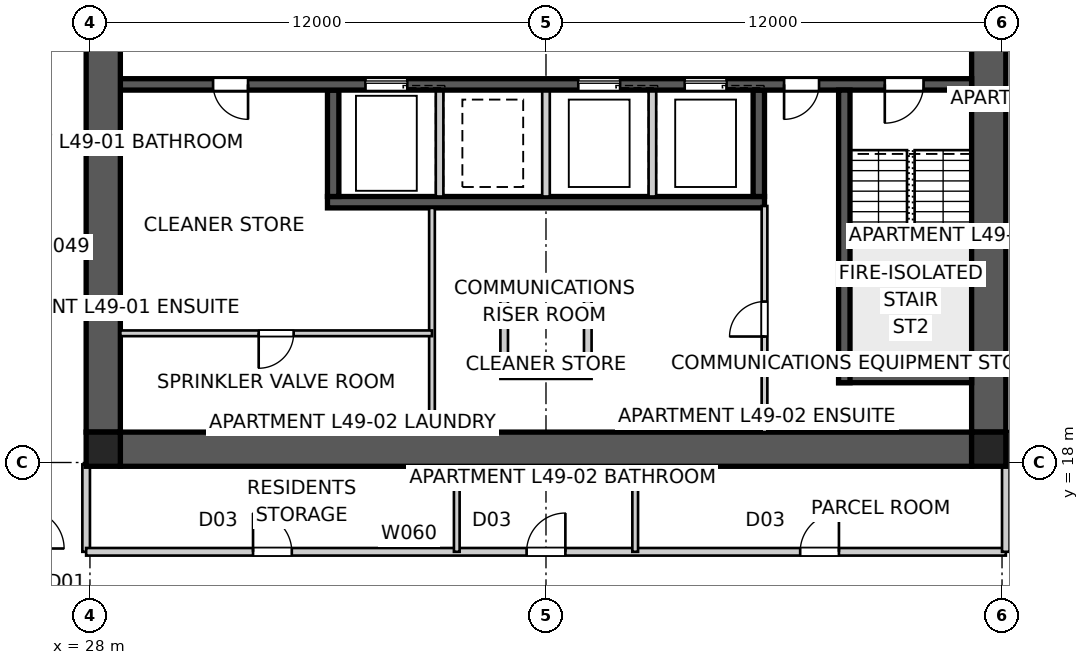
"""IFC4 building model, lengths in metres.
Left out: names, types, materials, properties, quantities, classifications, styles, units other than length and angle.
Written with IfcOpenShell. Run it as: python <this file> out.ifc"""

import sys

from ifc_helpers import new_model, si_unit, direction, frame, frame_2d, origin, origin_2d, place, context, subcontext, project, spatial, polyline, rectangle, outline, extrude, element, fill, save


model = new_model("IFC4")
c1 = context("Model", 3, precision=1e-05, world=origin(), true_north=direction((0.0, 1.0)))
c2 = subcontext(c1, "Body", "Model", "MODEL_VIEW")
j1 = project(units=[si_unit("LENGTHUNIT", "METRE"), si_unit("PLANEANGLEUNIT", "RADIAN")], contexts=[c1])
p1 = place(None, origin())
s1 = spatial("IfcSite", under=j1, at=p1, CompositionType="ELEMENT")
p2 = place(p1, origin())
s2 = spatial("IfcBuilding", under=s1, at=p2, CompositionType="ELEMENT")
p3 = place(p2, frame((0.0, 0.0, 179.4)))
s3 = spatial("IfcBuildingStorey", under=s2, at=p3, CompositionType="ELEMENT", Elevation=179.4)
p4 = place(p3, frame((51.2, 18.35, 0.0), z_axis=(0.0, 0.0, 1.0), x_axis=(-1.0, 0.0, 0.0)))
e1 = element("IfcWall", 1, at=p4, inside=s3, PredefinedType="SHEAR", context=c2, shape_type="SweptSolid", body=[
    extrude(outline(polyline([(0.0, -0.45), (22.4, -0.45), (22.4, -0.025), (22.85, -0.025), (22.85, 0.025), (22.4, 0.025), (22.4, 0.45), (0.0, 0.45), (0.0, 0.025), (-0.45, 0.025), (-0.45, -0.025), (0.0, -0.025), (0.0, -0.45)])), origin(), (0.0, 0.0, 1.0), 3.4),
])
p5 = place(p3, frame((51.65, 18.8, 0.0), z_axis=(0.0, 0.0, 1.0), x_axis=(0.0, 1.0, 0.0)))
e2 = element("IfcWall", 2, at=p5, inside=s3, PredefinedType="SHEAR", context=c2, shape_type="SweptSolid", body=[
    extrude(outline(polyline([(0.0, -0.45), (22.4, -0.45), (22.4, -0.025), (22.85, -0.025), (22.85, 0.025), (22.4, 0.025), (22.4, 0.45), (0.0, 0.45), (0.0, 0.025), (-0.45, 0.025), (-0.45, -0.025), (0.0, -0.025), (0.0, -0.45)])), origin(), (0.0, 0.0, 1.0), 3.4),
])
p6 = place(p5, frame((11.14, 0.0, 0.0)))
e3 = element("IfcOpeningElement", 3, at=p6, cuts=e2, PredefinedType="OPENING", context=c2, shape_type="SweptSolid", body=[
    extrude(rectangle(XDim=1.02, YDim=2.4, at=frame_2d((0.51, 1.2))), frame((0.0, 0.46, 0.0), z_axis=(0.0, -1.0, 0.0), x_axis=(1.0, 0.0, 0.0)), (0.0, 0.0, 1.0), 0.92),
])
p7 = place(p3, frame((28.35, 41.2, 0.0), z_axis=(0.0, 0.0, 1.0), x_axis=(0.0, -1.0, 0.0)))
e4 = element("IfcWall", 4, at=p7, inside=s3, PredefinedType="SHEAR", context=c2, shape_type="SweptSolid", body=[
    extrude(outline(polyline([(0.0, -0.45), (22.4, -0.45), (22.4, -0.025), (22.85, -0.025), (22.85, 0.025), (22.4, 0.025), (22.4, 0.45), (0.0, 0.45), (0.0, 0.025), (-0.45, 0.025), (-0.45, -0.025), (0.0, -0.025), (0.0, -0.45)])), origin(), (0.0, 0.0, 1.0), 3.4),
])
p8 = place(p7, frame((11.14, 0.0, 0.0)))
e5 = element("IfcOpeningElement", 5, at=p8, cuts=e4, PredefinedType="OPENING", context=c2, shape_type="SweptSolid", body=[
    extrude(rectangle(XDim=1.02, YDim=2.4, at=frame_2d((0.51, 1.2))), frame((0.0, 0.46, 0.0), z_axis=(0.0, -1.0, 0.0), x_axis=(1.0, 0.0, 0.0)), (0.0, 0.0, 1.0), 0.92),
])
p9 = place(p3, frame((51.2, 27.95, 0.0), z_axis=(0.0, 0.0, 1.0), x_axis=(-1.0, 0.0, 0.0)))
e6 = element("IfcWall", 6, at=p9, inside=s3, PredefinedType="SHEAR", context=c2, shape_type="SweptSolid", body=[
    extrude(rectangle(XDim=22.4, YDim=0.3, at=frame_2d((11.2, 0.0))), origin(), (0.0, 0.0, 1.0), 3.4),
])
p10 = place(p9, frame((19.04, 0.0, 0.0)))
e7 = element("IfcOpeningElement", 7, at=p10, cuts=e6, PredefinedType="OPENING", context=c2, shape_type="SweptSolid", body=[
    extrude(rectangle(XDim=0.92, YDim=2.1, at=frame_2d((0.46, 1.05))), frame((0.0, 0.16, 0.0), z_axis=(0.0, -1.0, 0.0), x_axis=(1.0, 0.0, 0.0)), (0.0, 0.0, 1.0), 0.32),
])
p11 = place(p9, frame((1.265, 0.0, 0.0)))
e8 = element("IfcOpeningElement", 8, at=p11, cuts=e6, PredefinedType="OPENING", context=c2, shape_type="SweptSolid", body=[
    extrude(rectangle(XDim=1.02, YDim=2.1, at=frame_2d((0.51, 1.05))), frame((0.0, 0.16, 0.0), z_axis=(0.0, -1.0, 0.0), x_axis=(1.0, 0.0, 0.0)), (0.0, 0.0, 1.0), 0.32),
])
p12 = place(p9, frame((4.015, 0.0, 0.0)))
e9 = element("IfcOpeningElement", 9, at=p12, cuts=e6, PredefinedType="OPENING", context=c2, shape_type="SweptSolid", body=[
    extrude(rectangle(XDim=0.92, YDim=2.1, at=frame_2d((0.46, 1.05))), frame((0.0, 0.16, 0.0), z_axis=(0.0, -1.0, 0.0), x_axis=(1.0, 0.0, 0.0)), (0.0, 0.0, 1.0), 0.32),
])
p13 = place(p9, frame((6.45, 0.0, 0.0)))
e10 = element("IfcOpeningElement", 10, at=p13, cuts=e6, PredefinedType="OPENING", context=c2, shape_type="SweptSolid", body=[
    extrude(rectangle(XDim=1.1, YDim=2.1, at=frame_2d((0.55, 1.05))), frame((0.0, 0.16, 0.0), z_axis=(0.0, -1.0, 0.0), x_axis=(1.0, 0.0, 0.0)), (0.0, 0.0, 1.0), 0.32),
])
p14 = place(p9, frame((9.25, 0.0, 0.0)))
e11 = element("IfcOpeningElement", 11, at=p14, cuts=e6, PredefinedType="OPENING", context=c2, shape_type="SweptSolid", body=[
    extrude(rectangle(XDim=1.1, YDim=2.1, at=frame_2d((0.55, 1.05))), frame((0.0, 0.16, 0.0), z_axis=(0.0, -1.0, 0.0), x_axis=(1.0, 0.0, 0.0)), (0.0, 0.0, 1.0), 0.32),
])
p15 = place(p9, frame((14.85, 0.0, 0.0)))
e12 = element("IfcOpeningElement", 12, at=p15, cuts=e6, PredefinedType="OPENING", context=c2, shape_type="SweptSolid", body=[
    extrude(rectangle(XDim=1.1, YDim=2.1, at=frame_2d((0.55, 1.05))), frame((0.0, 0.16, 0.0), z_axis=(0.0, -1.0, 0.0), x_axis=(1.0, 0.0, 0.0)), (0.0, 0.0, 1.0), 0.32),
])
p16 = place(p3, frame((45.75, 24.85, 0.0), z_axis=(0.0, 0.0, 1.0), x_axis=(-1.0, 0.0, 0.0)))
e13 = element("IfcWall", 13, at=p16, inside=s3, PredefinedType="SHEAR", context=c2, shape_type="SweptSolid", body=[
    extrude(rectangle(XDim=11.5, YDim=0.3, at=frame_2d((5.75, 0.0))), origin(), (0.0, 0.0, 1.0), 3.4),
])
p17 = place(p3, frame((45.6, 27.8, 0.0), z_axis=(0.0, 0.0, 1.0), x_axis=(0.0, -1.0, 0.0)))
e14 = element("IfcWall", 14, at=p17, inside=s3, PredefinedType="SHEAR", context=c2, shape_type="SweptSolid", body=[
    extrude(rectangle(XDim=2.8, YDim=0.3, at=frame_2d((1.4, 0.0))), origin(), (0.0, 0.0, 1.0), 3.4),
])
for number, where, z_axis, x_axis in (
    (15, (42.8, 27.8, 0.0), (0.0, 0.0, 1.0), (0.0, -1.0, 0.0)),
    (16, (40.0, 27.8, 0.0), (0.0, 0.0, 1.0), (0.0, -1.0, 0.0)),
    (17, (37.2, 27.8, 0.0), (0.0, 0.0, 1.0), (0.0, -1.0, 0.0)),
):
    element("IfcWall", number, at=place(p3, frame(where, z_axis=z_axis, x_axis=x_axis)), inside=s3, PredefinedType="SOLIDWALL", context=c2, shape_type="SweptSolid", body=[
        extrude(rectangle(XDim=2.8, YDim=0.2, at=frame_2d((1.4, 0.0))), origin(), (0.0, 0.0, 1.0), 3.4),
    ])
p18 = place(p3, frame((34.4, 27.8, 0.0), z_axis=(0.0, 0.0, 1.0), x_axis=(0.0, -1.0, 0.0)))
e18 = element("IfcWall", 18, at=p18, inside=s3, PredefinedType="SHEAR", context=c2, shape_type="SweptSolid", body=[
    extrude(rectangle(XDim=2.8, YDim=0.3, at=frame_2d((1.4, 0.0))), origin(), (0.0, 0.0, 1.0), 3.4),
])
p19 = place(p3, frame((47.85, 27.8, 0.0), z_axis=(0.0, 0.0, 1.0), x_axis=(0.0, -1.0, 0.0)))
e19 = element("IfcWall", 19, at=p19, inside=s3, PredefinedType="SHEAR", context=c2, shape_type="SweptSolid", body=[
    extrude(rectangle(XDim=7.7, YDim=0.3, at=frame_2d((3.85, 0.0))), origin(), (0.0, 0.0, 1.0), 3.4),
])
p20 = place(p3, frame((51.2, 20.25, 0.0), z_axis=(0.0, 0.0, 1.0), x_axis=(-1.0, 0.0, 0.0)))
e20 = element("IfcWall", 20, at=p20, inside=s3, PredefinedType="SHEAR", context=c2, shape_type="SweptSolid", body=[
    extrude(rectangle(XDim=3.5, YDim=0.3, at=frame_2d((1.75, 0.0))), origin(), (0.0, 0.0, 1.0), 3.4),
])
for number, where, z_axis, x_axis in (
    (21, (38.9, 22.4, 0.0), (0.0, 0.0, 1.0), (0.0, -1.0, 0.0)),
    (22, (41.1, 22.4, 0.0), (0.0, 0.0, 1.0), (0.0, -1.0, 0.0)),
):
    element("IfcWall", number, at=place(p3, frame(where, z_axis=z_axis, x_axis=x_axis)), inside=s3, PredefinedType="SOLIDWALL", context=c2, shape_type="SweptSolid", body=[
        extrude(rectangle(XDim=2.0, YDim=0.2, at=frame_2d((1.0, 0.0))), origin(), (0.0, 0.0, 1.0), 3.4),
    ])
for number, where, z_axis, x_axis in (
    (23, (38.8, 22.5, 0.0), (0.0, 0.0, 1.0), (1.0, 0.0, 0.0)),
    (24, (38.8, 20.3, 0.0), (0.0, 0.0, 1.0), (1.0, 0.0, 0.0)),
):
    element("IfcWall", number, at=place(p3, frame(where, z_axis=z_axis, x_axis=x_axis)), inside=s3, PredefinedType="SOLIDWALL", context=c2, shape_type="SweptSolid", body=[
        extrude(rectangle(XDim=2.4, YDim=0.2, at=frame_2d((1.2, 0.0))), origin(), (0.0, 0.0, 1.0), 3.4),
    ])
for number, where, z_axis, x_axis in (
    (25, (28.35, 18.35, 0.0), (0.0, 0.0, 1.0), (1.0, 0.0, 0.0)),
    (26, (51.65, 18.35, 0.0), (0.0, 0.0, 1.0), (1.0, 0.0, 0.0)),
):
    element("IfcColumn", number, at=place(p3, frame(where, z_axis=z_axis, x_axis=x_axis)), inside=s3, PredefinedType="COLUMN", context=c2, shape_type="SweptSolid", body=[
        extrude(rectangle(XDim=0.9, YDim=0.9, at=origin_2d()), origin(), (0.0, 0.0, 1.0), 3.4),
    ])
p21 = place(p3, frame((45.75, 18.8, 0.0), z_axis=(0.0, 0.0, 1.0), x_axis=(0.0, 1.0, 0.0)))
e27 = element("IfcWall", 27, at=p21, inside=s3, PredefinedType="SOLIDWALL", context=c2, shape_type="SweptSolid", body=[
    extrude(rectangle(XDim=5.95, YDim=0.15, at=frame_2d((2.975, 0.0))), origin(), (0.0, 0.0, 1.0), 3.25),
])
p22 = place(p21, frame((2.515, 0.0, 0.0)))
e28 = element("IfcOpeningElement", 28, at=p22, cuts=e27, PredefinedType="OPENING", context=c2, shape_type="SweptSolid", body=[
    extrude(rectangle(XDim=0.92, YDim=2.1, at=frame_2d((0.46, 1.05))), frame((0.0, 0.085, 0.0), z_axis=(0.0, -1.0, 0.0), x_axis=(1.0, 0.0, 0.0)), (0.0, 0.0, 1.0), 0.17),
])
p23 = place(p3, frame((37.0, 18.8, 0.0), z_axis=(0.0, 0.0, 1.0), x_axis=(0.0, 1.0, 0.0)))
e29 = element("IfcWall", 29, at=p23, inside=s3, PredefinedType="SOLIDWALL", context=c2, shape_type="SweptSolid", body=[
    extrude(rectangle(XDim=5.9, YDim=0.15, at=frame_2d((2.95, 0.0))), origin(), (0.0, 0.0, 1.0), 3.25),
])
p24 = place(p3, frame((37.0, 21.4, 0.0), z_axis=(0.0, 0.0, 1.0), x_axis=(-1.0, 0.0, 0.0)))
e30 = element("IfcWall", 30, at=p24, inside=s3, PredefinedType="SOLIDWALL", context=c2, shape_type="SweptSolid", body=[
    extrude(rectangle(XDim=8.2, YDim=0.15, at=frame_2d((4.1, 0.0))), origin(), (0.0, 0.0, 1.0), 3.25),
])
p25 = place(p24, frame((3.64, 0.0, 0.0)))
e31 = element("IfcOpeningElement", 31, at=p25, cuts=e30, PredefinedType="OPENING", context=c2, shape_type="SweptSolid", body=[
    extrude(rectangle(XDim=0.92, YDim=2.1, at=frame_2d((0.46, 1.05))), frame((0.0, 0.085, 0.0), z_axis=(0.0, -1.0, 0.0), x_axis=(1.0, 0.0, 0.0)), (0.0, 0.0, 1.0), 0.17),
])
p26 = place(p3, frame((27.9, 17.95, 0.0), z_axis=(0.0, 0.0, 1.0), x_axis=(0.0, -1.0, 0.0)))
e32 = element("IfcWall", 32, at=p26, inside=s3, PredefinedType="PARTITIONING", context=c2, shape_type="SweptSolid", body=[
    extrude(rectangle(XDim=2.3, YDim=0.2, at=frame_2d((1.15, 0.0))), origin(), (0.0, 0.0, 1.0), 3.25),
])
p27 = place(p3, frame((27.9, 15.65, 0.0), z_axis=(0.0, 0.0, 1.0), x_axis=(1.0, 0.0, 0.0)))
e33 = element("IfcWall", 33, at=p27, inside=s3, PredefinedType="PARTITIONING", context=c2, shape_type="SweptSolid", body=[
    extrude(rectangle(XDim=24.2, YDim=0.2, at=frame_2d((12.1, 0.0))), origin(), (0.0, 0.0, 1.0), 3.25),
])
p28 = place(p27, frame((4.391, 0.0, 0.0)))
e34 = element("IfcOpeningElement", 34, at=p28, cuts=e33, PredefinedType="OPENING", context=c2, shape_type="SweptSolid", body=[
    extrude(rectangle(XDim=1.02, YDim=2.1, at=frame_2d((0.51, 1.05))), frame((0.0, 0.11, 0.0), z_axis=(0.0, -1.0, 0.0), x_axis=(1.0, 0.0, 0.0)), (0.0, 0.0, 1.0), 0.22),
])
p29 = place(p27, frame((18.789, 0.0, 0.0)))
e35 = element("IfcOpeningElement", 35, at=p29, cuts=e33, PredefinedType="OPENING", context=c2, shape_type="SweptSolid", body=[
    extrude(rectangle(XDim=1.02, YDim=2.1, at=frame_2d((0.51, 1.05))), frame((0.0, 0.11, 0.0), z_axis=(0.0, -1.0, 0.0), x_axis=(1.0, 0.0, 0.0)), (0.0, 0.0, 1.0), 0.22),
])
p30 = place(p27, frame((11.59, 0.0, 0.0)))
e36 = element("IfcOpeningElement", 36, at=p30, cuts=e33, PredefinedType="OPENING", context=c2, shape_type="SweptSolid", body=[
    extrude(rectangle(XDim=1.02, YDim=2.1, at=frame_2d((0.51, 1.05))), frame((0.0, 0.11, 0.0), z_axis=(0.0, -1.0, 0.0), x_axis=(1.0, 0.0, 0.0)), (0.0, 0.0, 1.0), 0.22),
])
p31 = place(p3, frame((52.1, 15.65, 0.0), z_axis=(0.0, 0.0, 1.0), x_axis=(0.0, 1.0, 0.0)))
e37 = element("IfcWall", 37, at=p31, inside=s3, PredefinedType="PARTITIONING", context=c2, shape_type="SweptSolid", body=[
    extrude(rectangle(XDim=3.17, YDim=0.2, at=frame_2d((1.585, 0.0))), origin(), (0.0, 0.0, 1.0), 3.25),
])
for number, where, z_axis, x_axis in (
    (38, (37.653, 15.65, 0.0), (0.0, 0.0, 1.0), (0.0, 1.0, 0.0)),
    (39, (42.347, 15.65, 0.0), (0.0, 0.0, 1.0), (0.0, 1.0, 0.0)),
):
    element("IfcWall", number, at=place(p3, frame(where, z_axis=z_axis, x_axis=x_axis)), inside=s3, PredefinedType="SOLIDWALL", context=c2, shape_type="SweptSolid", body=[
        extrude(rectangle(XDim=2.25, YDim=0.15, at=frame_2d((1.125, 0.0))), origin(), (0.0, 0.0, 1.0), 3.25),
    ])
p32 = place(p10, origin())
e40 = element("IfcDoor", 40, at=p32, inside=s3, OperationType="SINGLE_SWING_LEFT", PredefinedType="DOOR", context=c2, shape_type="SweptSolid", body=[
    extrude(rectangle(XDim=0.92, YDim=2.1, at=frame_2d((0.46, 1.05))), frame((0.0, 0.025, 0.0), z_axis=(0.0, -1.0, 0.0), x_axis=(1.0, 0.0, 0.0)), (0.0, 0.0, 1.0), 0.05),
])
fill(e7, e40)
p33 = place(p11, origin())
e41 = element("IfcDoor", 41, at=p33, inside=s3, OperationType="SINGLE_SWING_RIGHT", PredefinedType="DOOR", context=c2, shape_type="SweptSolid", body=[
    extrude(rectangle(XDim=1.02, YDim=2.1, at=frame_2d((0.51, 1.05))), frame((0.0, 0.025, 0.0), z_axis=(0.0, -1.0, 0.0), x_axis=(1.0, 0.0, 0.0)), (0.0, 0.0, 1.0), 0.05),
])
fill(e8, e41)
p34 = place(p12, origin())
e42 = element("IfcDoor", 42, at=p34, inside=s3, OperationType="SINGLE_SWING_RIGHT", PredefinedType="DOOR", context=c2, shape_type="SweptSolid", body=[
    extrude(rectangle(XDim=0.92, YDim=2.1, at=frame_2d((0.46, 1.05))), frame((0.0, 0.025, 0.0), z_axis=(0.0, -1.0, 0.0), x_axis=(1.0, 0.0, 0.0)), (0.0, 0.0, 1.0), 0.05),
])
fill(e9, e42)
p35 = place(p28, origin())
e43 = element("IfcDoor", 43, at=p35, inside=s3, OperationType="SINGLE_SWING_LEFT", PredefinedType="DOOR", context=c2, shape_type="SweptSolid", body=[
    extrude(rectangle(XDim=1.02, YDim=2.1, at=frame_2d((0.51, 1.05))), frame((0.0, 0.025, 0.0), z_axis=(0.0, -1.0, 0.0), x_axis=(1.0, 0.0, 0.0)), (0.0, 0.0, 1.0), 0.05),
])
fill(e34, e43)
p36 = place(p29, origin())
e44 = element("IfcDoor", 44, at=p36, inside=s3, OperationType="SINGLE_SWING_RIGHT", PredefinedType="DOOR", context=c2, shape_type="SweptSolid", body=[
    extrude(rectangle(XDim=1.02, YDim=2.1, at=frame_2d((0.51, 1.05))), frame((0.0, 0.025, 0.0), z_axis=(0.0, -1.0, 0.0), x_axis=(1.0, 0.0, 0.0)), (0.0, 0.0, 1.0), 0.05),
])
fill(e35, e44)
p37 = place(p30, origin())
e45 = element("IfcDoor", 45, at=p37, inside=s3, OperationType="SINGLE_SWING_RIGHT", PredefinedType="DOOR", context=c2, shape_type="SweptSolid", body=[
    extrude(rectangle(XDim=1.02, YDim=2.1, at=frame_2d((0.51, 1.05))), frame((0.0, 0.025, 0.0), z_axis=(0.0, -1.0, 0.0), x_axis=(1.0, 0.0, 0.0)), (0.0, 0.0, 1.0), 0.05),
])
fill(e36, e45)
p38 = place(p25, origin())
e46 = element("IfcDoor", 46, at=p38, inside=s3, OperationType="SINGLE_SWING_RIGHT", PredefinedType="DOOR", context=c2, shape_type="SweptSolid", body=[
    extrude(rectangle(XDim=0.92, YDim=2.1, at=frame_2d((0.46, 1.05))), frame((0.0, 0.025, 0.0), z_axis=(0.0, -1.0, 0.0), x_axis=(1.0, 0.0, 0.0)), (0.0, 0.0, 1.0), 0.05),
])
fill(e31, e46)
p39 = place(p22, origin())
e47 = element("IfcDoor", 47, at=p39, inside=s3, OperationType="SINGLE_SWING_LEFT", PredefinedType="DOOR", context=c2, shape_type="SweptSolid", body=[
    extrude(rectangle(XDim=0.92, YDim=2.1, at=frame_2d((0.46, 1.05))), frame((0.0, 0.025, 0.0), z_axis=(0.0, -1.0, 0.0), x_axis=(1.0, 0.0, 0.0)), (0.0, 0.0, 1.0), 0.05),
])
fill(e28, e47)
p40 = place(p13, origin())
e48 = element("IfcDoor", 48, at=p40, inside=s3, OperationType="SLIDING_TO_LEFT", PredefinedType="DOOR", context=c2, shape_type="SweptSolid", body=[
    extrude(rectangle(XDim=1.1, YDim=2.1, at=frame_2d((0.55, 1.05))), frame((0.0, 0.025, 0.0), z_axis=(0.0, -1.0, 0.0), x_axis=(1.0, 0.0, 0.0)), (0.0, 0.0, 1.0), 0.05),
])
fill(e10, e48)
p41 = place(p14, origin())
e49 = element("IfcDoor", 49, at=p41, inside=s3, OperationType="SLIDING_TO_LEFT", PredefinedType="DOOR", context=c2, shape_type="SweptSolid", body=[
    extrude(rectangle(XDim=1.1, YDim=2.1, at=frame_2d((0.55, 1.05))), frame((0.0, 0.025, 0.0), z_axis=(0.0, -1.0, 0.0), x_axis=(1.0, 0.0, 0.0)), (0.0, 0.0, 1.0), 0.05),
])
fill(e11, e49)
p42 = place(p15, origin())
e50 = element("IfcDoor", 50, at=p42, inside=s3, OperationType="SLIDING_TO_LEFT", PredefinedType="DOOR", context=c2, shape_type="SweptSolid", body=[
    extrude(rectangle(XDim=1.1, YDim=2.1, at=frame_2d((0.55, 1.05))), frame((0.0, 0.025, 0.0), z_axis=(0.0, -1.0, 0.0), x_axis=(1.0, 0.0, 0.0)), (0.0, 0.0, 1.0), 0.05),
])
fill(e12, e50)
save(model, sys.argv[1])
